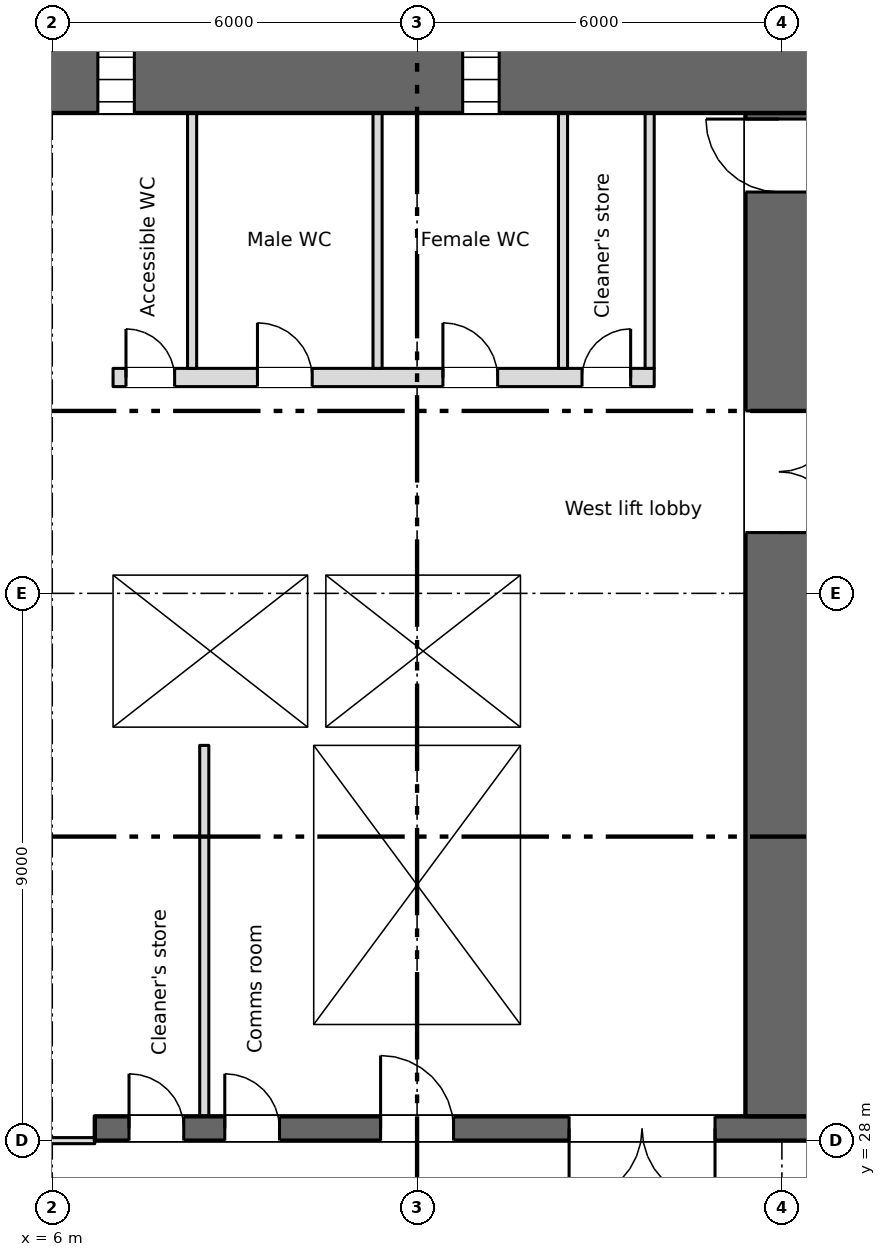
"""IFC4 building model, lengths in metres.
Left out: names, types, materials, properties, quantities, classifications, styles, units other than length and angle.
Written with IfcOpenShell. Run it as: python <this file> out.ifc"""

import sys

from ifc_helpers import new_model, si_unit, direction, frame, frame_2d, origin, place, context, subcontext, project, spatial, rectangle, extrude, element, fill, save


model = new_model("IFC4")
c1 = context("Model", 3, precision=1e-05, world=origin(), true_north=direction((0.0, 1.0)))
c2 = subcontext(c1, "Body", "Model", "MODEL_VIEW")
j1 = project(units=[si_unit("LENGTHUNIT", "METRE"), si_unit("PLANEANGLEUNIT", "RADIAN")], contexts=[c1])
p1 = place(None, origin())
s1 = spatial("IfcSite", under=j1, at=p1, CompositionType="ELEMENT")
p2 = place(p1, origin())
s2 = spatial("IfcBuilding", under=s1, at=p2, CompositionType="ELEMENT")
p3 = place(p2, frame((0.0, 0.0, 17.9)))
s3 = spatial("IfcBuildingStorey", under=s2, at=p3, CompositionType="ELEMENT", Elevation=17.9)
p4 = place(p3, frame((5.55, 45.45, 0.0), z_axis=(0.0, 0.0, 1.0), x_axis=(1.0, 0.0, 0.0)))
e1 = element("IfcWall", 1, at=p4, inside=s3, PredefinedType="SHEAR", context=c2, shape_type="SweptSolid", body=[
    extrude(rectangle(XDim=66.9, YDim=1.1, at=frame_2d((33.45, 0.0))), origin(), (0.0, 0.0, 1.0), 3.8),
])
p5 = place(p4, frame((1.2, 0.0, 0.6)))
e2 = element("IfcOpeningElement", 2, at=p5, cuts=e1, PredefinedType="OPENING", context=c2, shape_type="SweptSolid", body=[
    extrude(rectangle(XDim=0.6, YDim=2.7, at=frame_2d((0.3, 1.35))), frame((0.0, 0.56, 0.0), z_axis=(0.0, -1.0, 0.0), x_axis=(1.0, 0.0, 0.0)), (0.0, 0.0, 1.0), 1.12),
])
p6 = place(p4, frame((7.2, 0.0, 0.6)))
e3 = element("IfcOpeningElement", 3, at=p6, cuts=e1, PredefinedType="OPENING", context=c2, shape_type="SweptSolid", body=[
    extrude(rectangle(XDim=0.6, YDim=2.7, at=frame_2d((0.3, 1.35))), frame((0.0, 0.56, 0.0), z_axis=(0.0, -1.0, 0.0), x_axis=(1.0, 0.0, 0.0)), (0.0, 0.0, 1.0), 1.12),
])
p7 = place(p3, frame((6.7, 28.2, 0.0), z_axis=(0.0, 0.0, 1.0), x_axis=(1.0, 0.0, 0.0)))
e4 = element("IfcWall", 4, at=p7, inside=s3, PredefinedType="SHEAR", context=c2, shape_type="SweptSolid", body=[
    extrude(rectangle(XDim=66.3, YDim=0.4, at=frame_2d((33.15, 0.0))), origin(), (0.0, 0.0, 1.0), 3.8),
])
p8 = place(p7, frame((12.562, 0.0, 0.0)))
e5 = element("IfcOpeningElement", 5, at=p8, cuts=e4, PredefinedType="OPENING", context=c2, shape_type="SweptSolid", body=[
    extrude(rectangle(XDim=0.9, YDim=2.1, at=frame_2d((0.45, 1.05))), frame((0.0, 0.21, 0.0), z_axis=(0.0, -1.0, 0.0), x_axis=(1.0, 0.0, 0.0)), (0.0, 0.0, 1.0), 0.42),
])
p9 = place(p7, frame((15.137, 0.0, 0.0)))
e6 = element("IfcOpeningElement", 6, at=p9, cuts=e4, PredefinedType="OPENING", context=c2, shape_type="SweptSolid", body=[
    extrude(rectangle(XDim=0.9, YDim=2.1, at=frame_2d((0.45, 1.05))), frame((0.0, 0.21, 0.0), z_axis=(0.0, -1.0, 0.0), x_axis=(1.0, 0.0, 0.0)), (0.0, 0.0, 1.0), 0.42),
])
p10 = place(p7, frame((49.85, 0.0, 0.0)))
e7 = element("IfcOpeningElement", 7, at=p10, cuts=e4, PredefinedType="OPENING", context=c2, shape_type="SweptSolid", body=[
    extrude(rectangle(XDim=0.9, YDim=2.1, at=frame_2d((0.45, 1.05))), frame((0.0, 0.21, 0.0), z_axis=(0.0, -1.0, 0.0), x_axis=(1.0, 0.0, 0.0)), (0.0, 0.0, 1.0), 0.42),
])
p11 = place(p7, frame((0.562, 0.0, 0.0)))
e8 = element("IfcOpeningElement", 8, at=p11, cuts=e4, PredefinedType="OPENING", context=c2, shape_type="SweptSolid", body=[
    extrude(rectangle(XDim=0.9, YDim=2.1, at=frame_2d((0.45, 1.05))), frame((0.0, 0.21, 0.0), z_axis=(0.0, -1.0, 0.0), x_axis=(1.0, 0.0, 0.0)), (0.0, 0.0, 1.0), 0.42),
])
p12 = place(p7, frame((2.137, 0.0, 0.0)))
e9 = element("IfcOpeningElement", 9, at=p12, cuts=e4, PredefinedType="OPENING", context=c2, shape_type="SweptSolid", body=[
    extrude(rectangle(XDim=0.9, YDim=2.1, at=frame_2d((0.45, 1.05))), frame((0.0, 0.21, 0.0), z_axis=(0.0, -1.0, 0.0), x_axis=(1.0, 0.0, 0.0)), (0.0, 0.0, 1.0), 0.42),
])
p13 = place(p7, frame((61.45, 0.0, 0.0)))
e10 = element("IfcOpeningElement", 10, at=p13, cuts=e4, PredefinedType="OPENING", context=c2, shape_type="SweptSolid", body=[
    extrude(rectangle(XDim=0.9, YDim=2.1, at=frame_2d((0.45, 1.05))), frame((0.0, 0.21, 0.0), z_axis=(0.0, -1.0, 0.0), x_axis=(1.0, 0.0, 0.0)), (0.0, 0.0, 1.0), 0.42),
])
p14 = place(p7, frame((4.7, 0.0, 0.0)))
e11 = element("IfcOpeningElement", 11, at=p14, cuts=e4, PredefinedType="OPENING", context=c2, shape_type="SweptSolid", body=[
    extrude(rectangle(XDim=1.2, YDim=2.1, at=frame_2d((0.6, 1.05))), frame((0.0, 0.21, 0.0), z_axis=(0.0, -1.0, 0.0), x_axis=(1.0, 0.0, 0.0)), (0.0, 0.0, 1.0), 0.42),
])
p15 = place(p7, frame((31.7, 0.0, 0.0)))
e12 = element("IfcOpeningElement", 12, at=p15, cuts=e4, PredefinedType="OPENING", context=c2, shape_type="SweptSolid", body=[
    extrude(rectangle(XDim=1.2, YDim=2.1, at=frame_2d((0.6, 1.05))), frame((0.0, 0.21, 0.0), z_axis=(0.0, -1.0, 0.0), x_axis=(1.0, 0.0, 0.0)), (0.0, 0.0, 1.0), 0.42),
])
p16 = place(p7, frame((55.2, 0.0, 0.0)))
e13 = element("IfcOpeningElement", 13, at=p16, cuts=e4, PredefinedType="OPENING", context=c2, shape_type="SweptSolid", body=[
    extrude(rectangle(XDim=1.2, YDim=2.1, at=frame_2d((0.6, 1.05))), frame((0.0, 0.21, 0.0), z_axis=(0.0, -1.0, 0.0), x_axis=(1.0, 0.0, 0.0)), (0.0, 0.0, 1.0), 0.42),
])
p17 = place(p7, frame((21.7, 0.0, 0.0)))
e14 = element("IfcOpeningElement", 14, at=p17, cuts=e4, PredefinedType="OPENING", context=c2, shape_type="SweptSolid", body=[
    extrude(rectangle(XDim=1.2, YDim=2.1, at=frame_2d((0.6, 1.05))), frame((0.0, 0.21, 0.0), z_axis=(0.0, -1.0, 0.0), x_axis=(1.0, 0.0, 0.0)), (0.0, 0.0, 1.0), 0.42),
])
p18 = place(p7, frame((41.7, 0.0, 0.0)))
e15 = element("IfcOpeningElement", 15, at=p18, cuts=e4, PredefinedType="OPENING", context=c2, shape_type="SweptSolid", body=[
    extrude(rectangle(XDim=1.2, YDim=2.1, at=frame_2d((0.6, 1.05))), frame((0.0, 0.21, 0.0), z_axis=(0.0, -1.0, 0.0), x_axis=(1.0, 0.0, 0.0)), (0.0, 0.0, 1.0), 0.42),
])
p19 = place(p7, frame((24.85, 0.0, 0.0)))
e16 = element("IfcOpeningElement", 16, at=p19, cuts=e4, PredefinedType="OPENING", context=c2, shape_type="SweptSolid", body=[
    extrude(rectangle(XDim=2.4, YDim=2.1, at=frame_2d((1.2, 1.05))), frame((0.0, 0.21, 0.0), z_axis=(0.0, -1.0, 0.0), x_axis=(1.0, 0.0, 0.0)), (0.0, 0.0, 1.0), 0.42),
])
p20 = place(p7, frame((37.35, 0.0, 0.0)))
e17 = element("IfcOpeningElement", 17, at=p20, cuts=e4, PredefinedType="OPENING", context=c2, shape_type="SweptSolid", body=[
    extrude(rectangle(XDim=2.4, YDim=2.1, at=frame_2d((1.2, 1.05))), frame((0.0, 0.21, 0.0), z_axis=(0.0, -1.0, 0.0), x_axis=(1.0, 0.0, 0.0)), (0.0, 0.0, 1.0), 0.42),
])
p21 = place(p7, frame((7.8, 0.0, 0.0)))
e18 = element("IfcOpeningElement", 18, at=p21, cuts=e4, PredefinedType="OPENING", context=c2, shape_type="SweptSolid", body=[
    extrude(rectangle(XDim=2.4, YDim=2.1, at=frame_2d((1.2, 1.05))), frame((0.0, 0.21, 0.0), z_axis=(0.0, -1.0, 0.0), x_axis=(1.0, 0.0, 0.0)), (0.0, 0.0, 1.0), 0.42),
])
p22 = place(p7, frame((28.85, 0.0, 0.0)))
e19 = element("IfcOpeningElement", 19, at=p22, cuts=e4, PredefinedType="OPENING", context=c2, shape_type="SweptSolid", body=[
    extrude(rectangle(XDim=0.9, YDim=2.1, at=frame_2d((0.45, 1.05))), frame((0.0, 0.21, 0.0), z_axis=(0.0, -1.0, 0.0), x_axis=(1.0, 0.0, 0.0)), (0.0, 0.0, 1.0), 0.42),
])
p23 = place(p7, frame((34.85, 0.0, 0.0)))
e20 = element("IfcOpeningElement", 20, at=p23, cuts=e4, PredefinedType="OPENING", context=c2, shape_type="SweptSolid", body=[
    extrude(rectangle(XDim=0.9, YDim=2.1, at=frame_2d((0.45, 1.05))), frame((0.0, 0.21, 0.0), z_axis=(0.0, -1.0, 0.0), x_axis=(1.0, 0.0, 0.0)), (0.0, 0.0, 1.0), 0.42),
])
p24 = place(p3, frame((6.85, 28.4, 0.0), z_axis=(0.0, 0.0, 1.0), x_axis=(0.0, 1.0, 0.0)))
e21 = element("IfcWall", 21, at=p24, inside=s3, PredefinedType="SHEAR", context=c2, shape_type="SweptSolid", body=[
    extrude(rectangle(XDim=16.5, YDim=0.3, at=frame_2d((8.25, 0.0))), origin(), (0.0, 0.0, 1.0), 3.8),
])
p25 = place(p3, frame((17.95, 28.4, 0.0), z_axis=(0.0, 0.0, 1.0), x_axis=(0.0, 1.0, 0.0)))
e22 = element("IfcWall", 22, at=p25, inside=s3, PredefinedType="SHEAR", context=c2, shape_type="SweptSolid", body=[
    extrude(rectangle(XDim=16.5, YDim=1.1, at=frame_2d((8.25, 0.0))), origin(), (0.0, 0.0, 1.0), 3.8),
])
p26 = place(p25, frame((9.6, 0.0, 0.0)))
e23 = element("IfcOpeningElement", 23, at=p26, cuts=e22, PredefinedType="OPENING", context=c2, shape_type="SweptSolid", body=[
    extrude(rectangle(XDim=2.0, YDim=2.1, at=frame_2d((1.0, 1.05))), frame((0.0, 0.56, 0.0), z_axis=(0.0, -1.0, 0.0), x_axis=(1.0, 0.0, 0.0)), (0.0, 0.0, 1.0), 1.12),
])
p27 = place(p25, frame((15.2, 0.0, 0.0)))
e24 = element("IfcOpeningElement", 24, at=p27, cuts=e22, PredefinedType="OPENING", context=c2, shape_type="SweptSolid", body=[
    extrude(rectangle(XDim=1.2, YDim=2.1, at=frame_2d((0.6, 1.05))), frame((0.0, 0.56, 0.0), z_axis=(0.0, -1.0, 0.0), x_axis=(1.0, 0.0, 0.0)), (0.0, 0.0, 1.0), 1.12),
])
for number, where, z_axis, x_axis in (
    (25, (10.15, 28.4, 0.0), (0.0, 0.0, 1.0), (0.0, 1.0, 0.0)),
    (26, (13.85, 28.4, 0.0), (0.0, 0.0, 1.0), (0.0, 1.0, 0.0)),
):
    element("IfcWall", number, at=place(p3, frame(where, z_axis=z_axis, x_axis=x_axis)), inside=s3, PredefinedType="SHEAR", context=c2, shape_type="SweptSolid", body=[
        extrude(rectangle(XDim=6.1, YDim=0.3, at=frame_2d((3.05, 0.0))), origin(), (0.0, 0.0, 1.0), 3.8),
    ])
for number, where, z_axis, x_axis in (
    (27, (7.0, 34.65, 0.0), (0.0, 0.0, 1.0), (1.0, 0.0, 0.0)),
    (28, (7.0, 37.45, 0.0), (0.0, 0.0, 1.0), (1.0, 0.0, 0.0)),
):
    element("IfcWall", number, at=place(p3, frame(where, z_axis=z_axis, x_axis=x_axis)), inside=s3, PredefinedType="SHEAR", context=c2, shape_type="SweptSolid", body=[
        extrude(rectangle(XDim=7.0, YDim=0.3, at=frame_2d((3.5, 0.0))), origin(), (0.0, 0.0, 1.0), 3.8),
    ])
p28 = place(p3, frame((13.85, 34.8, 0.0), z_axis=(0.0, 0.0, 1.0), x_axis=(0.0, 1.0, 0.0)))
e29 = element("IfcWall", 29, at=p28, inside=s3, PredefinedType="SHEAR", context=c2, shape_type="SweptSolid", body=[
    extrude(rectangle(XDim=2.5, YDim=0.3, at=frame_2d((1.25, 0.0))), origin(), (0.0, 0.0, 1.0), 3.8),
])
p29 = place(p3, frame((7.0, 40.55, 0.0), z_axis=(0.0, 0.0, 1.0), x_axis=(1.0, 0.0, 0.0)))
e30 = element("IfcWall", 30, at=p29, inside=s3, PredefinedType="PARTITIONING", context=c2, shape_type="SweptSolid", body=[
    extrude(rectangle(XDim=8.9, YDim=0.3, at=frame_2d((4.45, 0.0))), origin(), (0.0, 0.0, 1.0), 3.8),
])
p30 = place(p29, frame((0.212, 0.0, 0.0)))
e31 = element("IfcOpeningElement", 31, at=p30, cuts=e30, PredefinedType="OPENING", context=c2, shape_type="SweptSolid", body=[
    extrude(rectangle(XDim=0.8, YDim=2.1, at=frame_2d((0.4, 1.05))), frame((0.0, 0.16, 0.0), z_axis=(0.0, -1.0, 0.0), x_axis=(1.0, 0.0, 0.0)), (0.0, 0.0, 1.0), 0.32),
])
p31 = place(p29, frame((2.375, 0.0, 0.0)))
e32 = element("IfcOpeningElement", 32, at=p31, cuts=e30, PredefinedType="OPENING", context=c2, shape_type="SweptSolid", body=[
    extrude(rectangle(XDim=0.9, YDim=2.1, at=frame_2d((0.45, 1.05))), frame((0.0, 0.16, 0.0), z_axis=(0.0, -1.0, 0.0), x_axis=(1.0, 0.0, 0.0)), (0.0, 0.0, 1.0), 0.32),
])
p32 = place(p29, frame((5.425, 0.0, 0.0)))
e33 = element("IfcOpeningElement", 33, at=p32, cuts=e30, PredefinedType="OPENING", context=c2, shape_type="SweptSolid", body=[
    extrude(rectangle(XDim=0.9, YDim=2.1, at=frame_2d((0.45, 1.05))), frame((0.0, 0.16, 0.0), z_axis=(0.0, -1.0, 0.0), x_axis=(1.0, 0.0, 0.0)), (0.0, 0.0, 1.0), 0.32),
])
p33 = place(p29, frame((7.712, 0.0, 0.0)))
e34 = element("IfcOpeningElement", 34, at=p33, cuts=e30, PredefinedType="OPENING", context=c2, shape_type="SweptSolid", body=[
    extrude(rectangle(XDim=0.8, YDim=2.1, at=frame_2d((0.4, 1.05))), frame((0.0, 0.16, 0.0), z_axis=(0.0, -1.0, 0.0), x_axis=(1.0, 0.0, 0.0)), (0.0, 0.0, 1.0), 0.32),
])
p34 = place(p3, frame((10.35, 34.8, 0.0), z_axis=(0.0, 0.0, 1.0), x_axis=(0.0, 1.0, 0.0)))
e35 = element("IfcWall", 35, at=p34, inside=s3, PredefinedType="SHEAR", context=c2, shape_type="SweptSolid", body=[
    extrude(rectangle(XDim=2.5, YDim=0.3, at=frame_2d((1.25, 0.0))), origin(), (0.0, 0.0, 1.0), 3.8),
])
p35 = place(p3, frame((15.825, 40.7, 0.0), z_axis=(0.0, 0.0, 1.0), x_axis=(0.0, 1.0, 0.0)))
e36 = element("IfcWall", 36, at=p35, inside=s3, PredefinedType="PARTITIONING", context=c2, shape_type="SweptSolid", body=[
    extrude(rectangle(XDim=4.2, YDim=0.15, at=frame_2d((2.1, 0.0))), origin(), (0.0, 0.0, 1.0), 3.8),
])
p36 = place(p3, frame((8.5, 28.4, 0.0), z_axis=(0.0, 0.0, 1.0), x_axis=(0.0, 1.0, 0.0)))
e37 = element("IfcWall", 37, at=p36, inside=s3, PredefinedType="PARTITIONING", context=c2, shape_type="SweptSolid", body=[
    extrude(rectangle(XDim=6.1, YDim=0.15, at=frame_2d((3.05, 0.0))), origin(), (0.0, 0.0, 1.0), 3.8),
])
for number, where, z_axis, x_axis in (
    (38, (8.3, 40.7, 0.0), (0.0, 0.0, 1.0), (0.0, 1.0, 0.0)),
    (39, (11.35, 40.7, 0.0), (0.0, 0.0, 1.0), (0.0, 1.0, 0.0)),
    (40, (14.4, 40.7, 0.0), (0.0, 0.0, 1.0), (0.0, 1.0, 0.0)),
):
    element("IfcWall", number, at=place(p3, frame(where, z_axis=z_axis, x_axis=x_axis)), inside=s3, PredefinedType="PARTITIONING", context=c2, shape_type="SweptSolid", body=[
        extrude(rectangle(XDim=4.2, YDim=0.15, at=frame_2d((2.1, 0.0))), origin(), (0.0, 0.0, 1.0), 3.8),
    ])
p37 = place(p3, frame((0.8, 28.0, 0.0), z_axis=(0.0, 0.0, 1.0), x_axis=(1.0, 0.0, 0.0)))
e41 = element("IfcWall", 41, at=p37, inside=s3, PredefinedType="PARTITIONING", context=c2, shape_type="SweptSolid", body=[
    extrude(rectangle(XDim=5.9, YDim=0.1, at=frame_2d((2.95, 0.0))), origin(), (0.0, 0.0, 1.0), 3.8),
])
p38 = place(p37, frame((2.05, 0.0, 0.0)))
e42 = element("IfcOpeningElement", 42, at=p38, cuts=e41, PredefinedType="OPENING", context=c2, shape_type="SweptSolid", body=[
    extrude(rectangle(XDim=1.8, YDim=2.1, at=frame_2d((0.9, 1.05))), frame((0.0, 0.06, 0.0), z_axis=(0.0, -1.0, 0.0), x_axis=(1.0, 0.0, 0.0)), (0.0, 0.0, 1.0), 0.12),
])
p39 = place(p5, origin())
e43 = element("IfcWindow", 43, at=p39, inside=s3, PartitioningType="SINGLE_PANEL", PredefinedType="WINDOW", context=c2, shape_type="SweptSolid", body=[
    extrude(rectangle(XDim=0.6, YDim=2.7, at=frame_2d((0.3, 1.35))), frame((0.0, 0.03, 0.0), z_axis=(0.0, -1.0, 0.0), x_axis=(1.0, 0.0, 0.0)), (0.0, 0.0, 1.0), 0.06),
])
fill(e2, e43)
p40 = place(p6, origin())
e44 = element("IfcWindow", 44, at=p40, inside=s3, PartitioningType="SINGLE_PANEL", PredefinedType="WINDOW", context=c2, shape_type="SweptSolid", body=[
    extrude(rectangle(XDim=0.6, YDim=2.7, at=frame_2d((0.3, 1.35))), frame((0.0, 0.03, 0.0), z_axis=(0.0, -1.0, 0.0), x_axis=(1.0, 0.0, 0.0)), (0.0, 0.0, 1.0), 0.06),
])
fill(e3, e44)
p41 = place(p11, origin())
e45 = element("IfcDoor", 45, at=p41, inside=s3, OperationType="SINGLE_SWING_LEFT", PredefinedType="DOOR", context=c2, shape_type="SweptSolid", body=[
    extrude(rectangle(XDim=0.9, YDim=2.1, at=frame_2d((0.45, 1.05))), frame((0.0, 0.025, 0.0), z_axis=(0.0, -1.0, 0.0), x_axis=(1.0, 0.0, 0.0)), (0.0, 0.0, 1.0), 0.05),
])
fill(e8, e45)
p42 = place(p12, origin())
e46 = element("IfcDoor", 46, at=p42, inside=s3, OperationType="SINGLE_SWING_LEFT", PredefinedType="DOOR", context=c2, shape_type="SweptSolid", body=[
    extrude(rectangle(XDim=0.9, YDim=2.1, at=frame_2d((0.45, 1.05))), frame((0.0, 0.025, 0.0), z_axis=(0.0, -1.0, 0.0), x_axis=(1.0, 0.0, 0.0)), (0.0, 0.0, 1.0), 0.05),
])
fill(e9, e46)
p43 = place(p30, origin())
e47 = element("IfcDoor", 47, at=p43, inside=s3, OperationType="SINGLE_SWING_LEFT", PredefinedType="DOOR", context=c2, shape_type="SweptSolid", body=[
    extrude(rectangle(XDim=0.8, YDim=2.1, at=frame_2d((0.4, 1.05))), frame((0.0, 0.025, 0.0), z_axis=(0.0, -1.0, 0.0), x_axis=(1.0, 0.0, 0.0)), (0.0, 0.0, 1.0), 0.05),
])
fill(e31, e47)
p44 = place(p31, origin())
e48 = element("IfcDoor", 48, at=p44, inside=s3, OperationType="SINGLE_SWING_LEFT", PredefinedType="DOOR", context=c2, shape_type="SweptSolid", body=[
    extrude(rectangle(XDim=0.9, YDim=2.1, at=frame_2d((0.45, 1.05))), frame((0.0, 0.025, 0.0), z_axis=(0.0, -1.0, 0.0), x_axis=(1.0, 0.0, 0.0)), (0.0, 0.0, 1.0), 0.05),
])
fill(e32, e48)
p45 = place(p32, origin())
e49 = element("IfcDoor", 49, at=p45, inside=s3, OperationType="SINGLE_SWING_LEFT", PredefinedType="DOOR", context=c2, shape_type="SweptSolid", body=[
    extrude(rectangle(XDim=0.9, YDim=2.1, at=frame_2d((0.45, 1.05))), frame((0.0, 0.025, 0.0), z_axis=(0.0, -1.0, 0.0), x_axis=(1.0, 0.0, 0.0)), (0.0, 0.0, 1.0), 0.05),
])
fill(e33, e49)
p46 = place(p33, origin())
e50 = element("IfcDoor", 50, at=p46, inside=s3, OperationType="SINGLE_SWING_RIGHT", PredefinedType="DOOR", context=c2, shape_type="SweptSolid", body=[
    extrude(rectangle(XDim=0.8, YDim=2.1, at=frame_2d((0.4, 1.05))), frame((0.0, 0.025, 0.0), z_axis=(0.0, -1.0, 0.0), x_axis=(1.0, 0.0, 0.0)), (0.0, 0.0, 1.0), 0.05),
])
fill(e34, e50)
p47 = place(p14, origin())
e51 = element("IfcDoor", 51, at=p47, inside=s3, OperationType="SINGLE_SWING_LEFT", PredefinedType="DOOR", context=c2, shape_type="SweptSolid", body=[
    extrude(rectangle(XDim=1.2, YDim=2.1, at=frame_2d((0.6, 1.05))), frame((0.0, 0.025, 0.0), z_axis=(0.0, -1.0, 0.0), x_axis=(1.0, 0.0, 0.0)), (0.0, 0.0, 1.0), 0.05),
])
fill(e11, e51)
p48 = place(p21, origin())
e52 = element("IfcDoor", 52, at=p48, inside=s3, OperationType="DOUBLE_DOOR_SINGLE_SWING", PredefinedType="DOOR", context=c2, shape_type="SweptSolid", body=[
    extrude(rectangle(XDim=2.4, YDim=2.1, at=frame_2d((1.2, 1.05))), frame((0.0, 0.025, 0.0), z_axis=(0.0, -1.0, 0.0), x_axis=(1.0, 0.0, 0.0)), (0.0, 0.0, 1.0), 0.05),
])
fill(e18, e52)
p49 = place(p26, origin())
e53 = element("IfcDoor", 53, at=p49, inside=s3, OperationType="DOUBLE_DOOR_SINGLE_SWING", PredefinedType="DOOR", context=c2, shape_type="SweptSolid", body=[
    extrude(rectangle(XDim=2.0, YDim=2.1, at=frame_2d((1.0, 1.05))), frame((0.0, 0.025, 0.0), z_axis=(0.0, -1.0, 0.0), x_axis=(1.0, 0.0, 0.0)), (0.0, 0.0, 1.0), 0.05),
])
fill(e23, e53)
p50 = place(p27, origin())
e54 = element("IfcDoor", 54, at=p50, inside=s3, OperationType="SINGLE_SWING_RIGHT", PredefinedType="DOOR", context=c2, shape_type="SweptSolid", body=[
    extrude(rectangle(XDim=1.2, YDim=2.1, at=frame_2d((0.6, 1.05))), frame((0.0, 0.025, 0.0), z_axis=(0.0, -1.0, 0.0), x_axis=(1.0, 0.0, 0.0)), (0.0, 0.0, 1.0), 0.05),
])
fill(e24, e54)
save(model, sys.argv[1])
